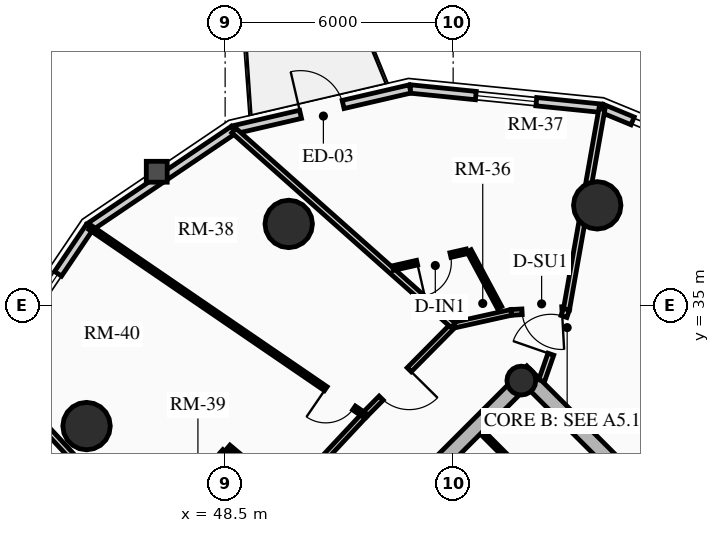
"""IFC4 building model, lengths in metres.
Left out: names, types, materials, properties, quantities, classifications, styles, units other than length and angle.
Written with IfcOpenShell. Run it as: python <this file> out.ifc"""

import sys

from ifc_helpers import new_model, si_unit, direction, frame, frame_2d, origin, origin_2d, place, context, subcontext, project, spatial, rectangle, circle, hollow_circle, extrude, source, transform, mapped, element, fill, save


model = new_model("IFC4")
c1 = context("Model", 3, precision=1e-05, world=origin(), true_north=direction((0.0, 1.0)))
c2 = subcontext(c1, "Body", "Model", "MODEL_VIEW")
j1 = project(units=[si_unit("LENGTHUNIT", "METRE"), si_unit("PLANEANGLEUNIT", "RADIAN")], contexts=[c1])
p1 = place(None, origin())
s1 = spatial("IfcSite", under=j1, at=p1, CompositionType="ELEMENT")
p2 = place(p1, origin())
s2 = spatial("IfcBuilding", under=s1, at=p2, CompositionType="ELEMENT")
p3 = place(p2, frame((0.0, 0.0, 154.51)))
s3 = spatial("IfcBuildingStorey", under=s2, at=p3, CompositionType="ELEMENT", Elevation=154.51)
p4 = place(p3, frame((66.268, 23.298, 0.0), z_axis=(0.0, 0.0, 1.0), x_axis=(-0.707106781187, 0.707106781187, 0.0)))
e1 = element("IfcWall", 1, at=p4, inside=s3, PredefinedType="SHEAR", context=c2, shape_type="SweptSolid", body=[
    extrude(rectangle(XDim=14.1, YDim=0.4, at=frame_2d((7.05, 0.0))), origin(), (0.0, 0.0, 1.0), 2.91),
])
p5 = place(p3, frame((48.873, 25.561, 0.0), z_axis=(0.0, 0.0, 1.0), x_axis=(0.707106781187, 0.707106781187, 0.0)))
e2 = element("IfcWall", 2, at=p5, inside=s3, PredefinedType="SHEAR", context=c2, shape_type="SweptSolid", body=[
    extrude(rectangle(XDim=10.7, YDim=0.4, at=frame_2d((5.35, 0.0))), origin(), (0.0, 0.0, 1.0), 2.91),
])
m1 = source(origin(), c2, "Body", "SweptSolid", [
    extrude(rectangle(XDim=1.5, YDim=2.02, at=frame_2d((0.75, 1.01))), frame((0.0, 0.21, 0.0), z_axis=(0.0, -1.0, 0.0), x_axis=(1.0, 0.0, 0.0)), (0.0, 0.0, 1.0), 0.42),
])
p6 = place(p5, frame((4.6, 0.0, 0.0)))
e3 = element("IfcOpeningElement", 3, at=p6, cuts=e2, PredefinedType="OPENING", context=c2, shape_type="MappedRepresentation", body=[
    mapped(m1, transform((0.0, 0.0, 0.0), x_axis=(1.0, 0.0, 0.0), y_axis=(0.0, 1.0, 0.0), z_axis=(0.0, 0.0, 1.0), scale=1.0)),
])
p7 = place(p3, frame((56.294, 33.024, 0.0), z_axis=(0.0, 0.0, 1.0), x_axis=(0.707106781187, 0.707106781187, 0.0)))
e4 = element("IfcColumn", 4, at=p7, inside=s3, PredefinedType="COLUMN", context=c2, shape_type="SweptSolid", body=[
    extrude(hollow_circle(Radius=0.38, WallThickness=0.032, at=origin_2d()), origin(), (0.0, 0.0, 1.0), 2.91),
])
for number, where, z_axis, x_axis in (
    (5, (58.291, 37.635, 0.0), (0.0, 0.0, 1.0), (1.0, 0.0, 0.0)),
    (6, (50.173, 37.146, 0.0), (0.0, 0.0, 1.0), (1.0, 0.0, 0.0)),
    (7, (44.854, 31.827, 0.0), (0.0, 0.0, 1.0), (1.0, 0.0, 0.0)),
):
    element("IfcColumn", number, at=place(p3, frame(where, z_axis=z_axis, x_axis=x_axis)), inside=s3, PredefinedType="USERDEFINED", context=c2, shape_type="SweptSolid", body=[
        extrude(circle(Radius=0.625, at=origin_2d()), origin(), (0.0, 0.0, 1.0), 2.91),
    ])
p8 = place(p3, frame((58.418, 40.189, 0.0), z_axis=(0.0, 0.0, 1.0), x_axis=(0.924556017656, -0.381046152345, 0.0)))
e8 = element("IfcWall", 8, at=p8, inside=s3, PredefinedType="SOLIDWALL", context=c2, shape_type="SweptSolid", body=[
    extrude(rectangle(XDim=0.87, YDim=0.22, at=frame_2d((0.435, 0.0))), origin(), (0.0, 0.0, 1.0), 2.245),
])
p9 = place(p3, frame((53.367, 40.698, 0.0), z_axis=(0.0, 0.0, 1.0), x_axis=(0.994959267396, -0.100279889424, 0.0)))
e9 = element("IfcWall", 9, at=p9, inside=s3, PredefinedType="SOLIDWALL", context=c2, shape_type="SweptSolid", body=[
    extrude(rectangle(XDim=5.076, YDim=0.22, at=frame_2d((2.538, 0.0))), origin(), (0.0, 0.0, 1.0), 2.245),
])
m2 = source(origin(), c2, "Body", "SweptSolid", [
    extrude(rectangle(XDim=1.6, YDim=1.3, at=frame_2d((0.8, 0.65))), frame((0.0, 0.12, 0.0), z_axis=(0.0, -1.0, 0.0), x_axis=(1.0, 0.0, 0.0)), (0.0, 0.0, 1.0), 0.24),
])
p10 = place(p9, frame((1.738, 0.0, 0.65)))
e10 = element("IfcOpeningElement", 10, at=p10, cuts=e9, PredefinedType="OPENING", context=c2, shape_type="MappedRepresentation", body=[
    mapped(m2, transform((0.0, 0.0, 0.0), x_axis=(1.0, 0.0, 0.0), y_axis=(0.0, 1.0, 0.0), z_axis=(0.0, 0.0, 1.0), scale=1.0)),
])
p11 = place(p3, frame((48.721, 39.622, 0.0), z_axis=(0.0, 0.0, 1.0), x_axis=(0.974206226622, 0.225659540039, 0.0)))
e11 = element("IfcWall", 11, at=p11, inside=s3, PredefinedType="SOLIDWALL", context=c2, shape_type="SweptSolid", body=[
    extrude(rectangle(XDim=4.769, YDim=0.22, at=frame_2d((2.385, 0.0))), origin(), (0.0, 0.0, 1.0), 2.245),
])
m3 = source(origin(), c2, "Body", "SweptSolid", [
    extrude(rectangle(XDim=1.15, YDim=2.005, at=frame_2d((0.575, 1.002))), frame((0.0, 0.12, 0.0), z_axis=(0.0, -1.0, 0.0), x_axis=(1.0, 0.0, 0.0)), (0.0, 0.0, 1.0), 0.24),
])
p12 = place(p11, frame((1.81, 0.0, 0.0)))
e12 = element("IfcOpeningElement", 12, at=p12, cuts=e11, PredefinedType="OPENING", context=c2, shape_type="MappedRepresentation", body=[
    mapped(m3, transform((0.0, 0.0, 0.0), x_axis=(1.0, 0.0, 0.0), y_axis=(0.0, 1.0, 0.0), z_axis=(0.0, 0.0, 1.0), scale=1.0)),
])
p13 = place(p3, frame((44.935, 37.065, 0.0), z_axis=(0.0, 0.0, 1.0), x_axis=(0.828739009952, 0.559635286042, 0.0)))
e13 = element("IfcWall", 13, at=p13, inside=s3, PredefinedType="SOLIDWALL", context=c2, shape_type="SweptSolid", body=[
    extrude(rectangle(XDim=4.569, YDim=0.22, at=frame_2d((2.284, 0.0))), origin(), (0.0, 0.0, 1.0), 2.245),
])
p14 = place(p3, frame((42.378, 33.279, 0.0), z_axis=(0.0, 0.0, 1.0), x_axis=(0.559635286042, 0.828739009952, 0.0)))
e14 = element("IfcWall", 14, at=p14, inside=s3, PredefinedType="SOLIDWALL", context=c2, shape_type="SweptSolid", body=[
    extrude(rectangle(XDim=4.569, YDim=0.22, at=frame_2d((2.284, 0.0))), origin(), (0.0, 0.0, 1.0), 2.245),
])
p15 = place(p14, frame((1.484, 0.0, 0.65)))
e15 = element("IfcOpeningElement", 15, at=p15, cuts=e14, PredefinedType="OPENING", context=c2, shape_type="MappedRepresentation", body=[
    mapped(m2, transform((0.0, 0.0, 0.0), x_axis=(1.0, 0.0, 0.0), y_axis=(0.0, 1.0, 0.0), z_axis=(0.0, 0.0, 1.0), scale=1.0)),
])
p16 = place(p3, frame((57.981, 28.941, 0.0), z_axis=(0.0, 0.0, 1.0), x_axis=(-0.707074823725, 0.707138737204, 0.0)))
e16 = element("IfcWall", 16, at=p16, inside=s3, PredefinedType="PARTITIONING", context=c2, shape_type="SweptSolid", body=[
    extrude(rectangle(XDim=3.82, YDim=0.125, at=frame_2d((1.91, 0.0))), origin(), (0.0, 0.0, 1.0), 2.675),
])
m4 = source(origin(), c2, "Body", "SweptSolid", [
    extrude(rectangle(XDim=0.9, YDim=2.005, at=frame_2d((0.45, 1.002))), frame((0.0, 0.073, 0.0), z_axis=(0.0, -1.0, 0.0), x_axis=(1.0, 0.0, 0.0)), (0.0, 0.0, 1.0), 0.145),
])
p17 = place(p16, frame((1.45, 0.0, 0.0)))
e17 = element("IfcOpeningElement", 17, at=p17, cuts=e16, PredefinedType="OPENING", context=c2, shape_type="MappedRepresentation", body=[
    mapped(m4, transform((0.0, 0.0, 0.0), x_axis=(1.0, 0.0, 0.0), y_axis=(0.0, 1.0, 0.0), z_axis=(0.0, 0.0, 1.0), scale=1.0)),
])
p18 = place(p3, frame((57.482, 34.899, 0.0), z_axis=(0.0, 0.0, 1.0), x_axis=(-0.998466026722, -0.055367801852, 0.0)))
e18 = element("IfcWall", 18, at=p18, inside=s3, PredefinedType="PARTITIONING", context=c2, shape_type="SweptSolid", body=[
    extrude(rectangle(XDim=1.455, YDim=0.15, at=frame_2d((0.728, 0.0))), origin(), (0.0, 0.0, 1.0), 2.245),
])
m5 = source(origin(), c2, "Body", "SweptSolid", [
    extrude(rectangle(XDim=1.05, YDim=2.015, at=frame_2d((0.525, 1.007))), frame((0.0, 0.085, 0.0), z_axis=(0.0, -1.0, 0.0), x_axis=(1.0, 0.0, 0.0)), (0.0, 0.0, 1.0), 0.17),
])
p19 = place(p18, frame((0.12, 0.0, 0.0)))
e19 = element("IfcOpeningElement", 19, at=p19, cuts=e18, PredefinedType="OPENING", context=c2, shape_type="MappedRepresentation", body=[
    mapped(m5, transform((0.0, 0.0, 0.0), x_axis=(1.0, 0.0, 0.0), y_axis=(0.0, 1.0, 0.0), z_axis=(0.0, 0.0, 1.0), scale=1.0)),
])
p20 = place(p3, frame((56.029, 34.819, 0.0), z_axis=(0.0, 0.0, 1.0), x_axis=(-0.976117289068, -0.217244189754, 0.0)))
e20 = element("IfcWall", 20, at=p20, inside=s3, PredefinedType="PARTITIONING", context=c2, shape_type="SweptSolid", body=[
    extrude(rectangle(XDim=1.565, YDim=0.15, at=frame_2d((0.783, 0.0))), origin(), (0.0, 0.0, 1.0), 2.245),
])
p21 = place(p3, frame((54.501, 34.479, 0.0), z_axis=(0.0, 0.0, 1.0), x_axis=(-0.70346073929, -0.710734119258, 0.0)))
e21 = element("IfcWall", 21, at=p21, inside=s3, PredefinedType="PARTITIONING", context=c2, shape_type="SweptSolid", body=[
    extrude(rectangle(XDim=3.323, YDim=0.15, at=frame_2d((1.662, 0.0))), origin(), (0.0, 0.0, 1.0), 2.245),
])
p22 = place(p21, frame((1.645, 0.0, 0.0)))
e22 = element("IfcOpeningElement", 22, at=p22, cuts=e21, PredefinedType="OPENING", context=c2, shape_type="MappedRepresentation", body=[
    mapped(m5, transform((0.0, 0.0, 0.0), x_axis=(1.0, 0.0, 0.0), y_axis=(0.0, 1.0, 0.0), z_axis=(0.0, 0.0, 1.0), scale=1.0)),
])
p23 = place(p3, frame((52.163, 32.117, 0.0), z_axis=(0.0, 0.0, 1.0), x_axis=(-0.682485296115, -0.730899323154, 0.0)))
e23 = element("IfcWall", 23, at=p23, inside=s3, PredefinedType="PARTITIONING", context=c2, shape_type="SweptSolid", body=[
    extrude(rectangle(XDim=6.404, YDim=0.15, at=frame_2d((3.202, 0.0))), origin(), (0.0, 0.0, 1.0), 2.245),
])
p24 = place(p3, frame((57.482, 34.899, 0.0), z_axis=(0.0, 0.0, 1.0), x_axis=(0.174251112754, 0.98470124896, 0.0)))
e24 = element("IfcWall", 24, at=p24, inside=s3, PredefinedType="PARTITIONING", context=c2, shape_type="SweptSolid", body=[
    extrude(rectangle(XDim=5.352, YDim=0.16, at=frame_2d((2.676, 0.0))), origin(), (0.0, 0.0, 1.0), 2.245),
])
p25 = place(p3, frame((54.501, 34.479, 0.0), z_axis=(0.0, 0.0, 1.0), x_axis=(-0.747641382601, 0.66410267506, 0.0)))
e25 = element("IfcWall", 25, at=p25, inside=s3, PredefinedType="PARTITIONING", context=c2, shape_type="SweptSolid", body=[
    extrude(rectangle(XDim=7.718, YDim=0.16, at=frame_2d((3.859, 0.0))), origin(), (0.0, 0.0, 1.0), 2.245),
])
p26 = place(p3, frame((47.792, 27.436, 0.0), z_axis=(0.0, 0.0, 1.0), x_axis=(-0.679077160958, 0.734066897132, 0.0)))
e26 = element("IfcWall", 26, at=p26, inside=s3, PredefinedType="PARTITIONING", context=c2, shape_type="SweptSolid", body=[
    extrude(rectangle(XDim=7.947, YDim=0.16, at=frame_2d((3.974, 0.0))), origin(), (0.0, 0.0, 1.0), 2.245),
])
p27 = place(p3, frame((56.828, 33.021, 0.0), z_axis=(0.0, 0.0, 1.0), x_axis=(0.328682472103, 0.944440486496, 0.0)))
e27 = element("IfcWall", 27, at=p27, inside=s3, PredefinedType="PARTITIONING", context=c2, shape_type="SweptSolid", body=[
    extrude(rectangle(XDim=1.989, YDim=0.16, at=frame_2d((0.995, 0.0))), origin(), (0.0, 0.0, 1.0), 2.245),
])
m6 = source(origin(), c2, "Body", "SweptSolid", [
    extrude(rectangle(XDim=1.05, YDim=2.015, at=frame_2d((0.525, 1.007))), frame((0.0, 0.09, 0.0), z_axis=(0.0, -1.0, 0.0), x_axis=(1.0, 0.0, 0.0)), (0.0, 0.0, 1.0), 0.18),
])
p28 = place(p27, frame((0.739, 0.0, 0.0)))
e28 = element("IfcOpeningElement", 28, at=p28, cuts=e27, PredefinedType="OPENING", context=c2, shape_type="MappedRepresentation", body=[
    mapped(m6, transform((0.0, 0.0, 0.0), x_axis=(1.0, 0.0, 0.0), y_axis=(0.0, 1.0, 0.0), z_axis=(0.0, 0.0, 1.0), scale=1.0)),
])
p29 = place(p3, frame((55.722, 34.944, 0.0), z_axis=(0.0, 0.0, 1.0), x_axis=(-0.473482169178, 0.880803403417, 0.0)))
e29 = element("IfcWall", 29, at=p29, inside=s3, PredefinedType="PARTITIONING", context=c2, shape_type="SweptSolid", body=[
    extrude(rectangle(XDim=1.698, YDim=0.125, at=frame_2d((0.849, 0.0))), origin(), (0.0, 0.0, 1.0), 2.245),
])
p30 = place(p3, frame((54.858, 36.425, 0.0), z_axis=(0.0, 0.0, 1.0), x_axis=(-0.975061820415, -0.221933427785, 0.0)))
e30 = element("IfcWall", 30, at=p30, inside=s3, PredefinedType="PARTITIONING", context=c2, shape_type="SweptSolid", body=[
    extrude(rectangle(XDim=1.993, YDim=0.125, at=frame_2d((0.997, 0.0))), origin(), (0.0, 0.0, 1.0), 2.675),
])
p31 = place(p30, frame((0.44, 0.0, 0.0)))
e31 = element("IfcOpeningElement", 31, at=p31, cuts=e30, PredefinedType="OPENING", context=c2, shape_type="MappedRepresentation", body=[
    mapped(m4, transform((0.0, 0.0, 0.0), x_axis=(1.0, 0.0, 0.0), y_axis=(0.0, 1.0, 0.0), z_axis=(0.0, 0.0, 1.0), scale=1.0)),
])
p32 = place(p3, frame((52.163, 32.117, 0.0), z_axis=(0.0, 0.0, 1.0), x_axis=(-0.825403853282, 0.564542716707, 0.0)))
e32 = element("IfcWall", 32, at=p32, inside=s3, PredefinedType="PARTITIONING", context=c2, shape_type="SweptSolid", body=[
    extrude(rectangle(XDim=8.74, YDim=0.125, at=frame_2d((4.37, 0.0))), origin(), (0.0, 0.0, 1.0), 2.245),
])
p33 = place(p32, frame((0.33, 0.0, 0.0)))
e33 = element("IfcOpeningElement", 33, at=p33, cuts=e32, PredefinedType="OPENING", context=c2, shape_type="MappedRepresentation", body=[
    mapped(m4, transform((0.0, 0.0, 0.0), x_axis=(1.0, 0.0, 0.0), y_axis=(0.0, 1.0, 0.0), z_axis=(0.0, 0.0, 1.0), scale=1.0)),
])
p34 = place(p3, frame((49.961, 30.124, 0.0), z_axis=(0.0, 0.0, 1.0), x_axis=(-0.766210982885, 0.64258908309, 0.0)))
e34 = element("IfcWall", 34, at=p34, inside=s3, PredefinedType="PARTITIONING", context=c2, shape_type="SweptSolid", body=[
    extrude(rectangle(XDim=1.795, YDim=0.125, at=frame_2d((0.897, 0.0))), origin(), (0.0, 0.0, 1.0), 2.675),
])
p35 = place(p3, frame((48.488, 31.166, 0.0), z_axis=(0.0, 0.0, 1.0), x_axis=(-0.660635615229, -0.750706722956, 0.0)))
e35 = element("IfcWall", 35, at=p35, inside=s3, PredefinedType="PARTITIONING", context=c2, shape_type="SweptSolid", body=[
    extrude(rectangle(XDim=2.852, YDim=0.125, at=frame_2d((1.426, 0.0))), origin(), (0.0, 0.0, 1.0), 2.245),
])
p36 = place(p35, frame((0.12, 0.0, 0.0)))
e36 = element("IfcOpeningElement", 36, at=p36, cuts=e35, PredefinedType="OPENING", context=c2, shape_type="MappedRepresentation", body=[
    mapped(m4, transform((0.0, 0.0, 0.0), x_axis=(1.0, 0.0, 0.0), y_axis=(0.0, 1.0, 0.0), z_axis=(0.0, 0.0, 1.0), scale=1.0)),
])
m7 = source(origin(), c2, "Body", "SweptSolid", [
    extrude(rectangle(XDim=1.6, YDim=1.3, at=frame_2d((0.8, 0.65))), frame((0.0, 0.03, 0.0), z_axis=(0.0, -1.0, 0.0), x_axis=(1.0, 0.0, 0.0)), (0.0, 0.0, 1.0), 0.06),
])
p37 = place(p10, origin())
e37 = element("IfcWindow", 37, at=p37, inside=s3, PartitioningType="SINGLE_PANEL", PredefinedType="WINDOW", context=c2, shape_type="MappedRepresentation", body=[
    mapped(m7, transform((0.0, 0.0, 0.0), x_axis=(1.0, 0.0, 0.0), y_axis=(0.0, 1.0, 0.0), z_axis=(0.0, 0.0, 1.0), scale=1.0)),
])
fill(e10, e37)
m8 = source(origin(), c2, "Body", "SweptSolid", [
    extrude(rectangle(XDim=1.15, YDim=2.005, at=frame_2d((0.575, 1.002))), frame((0.0, 0.025, 0.0), z_axis=(0.0, -1.0, 0.0), x_axis=(1.0, 0.0, 0.0)), (0.0, 0.0, 1.0), 0.05),
])
p38 = place(p12, origin())
e38 = element("IfcDoor", 38, at=p38, inside=s3, OperationType="SINGLE_SWING_LEFT", PredefinedType="DOOR", context=c2, shape_type="MappedRepresentation", body=[
    mapped(m8, transform((0.0, 0.0, 0.0), x_axis=(1.0, 0.0, 0.0), y_axis=(0.0, 1.0, 0.0), z_axis=(0.0, 0.0, 1.0), scale=1.0)),
])
fill(e12, e38)
p39 = place(p15, origin())
e39 = element("IfcWindow", 39, at=p39, inside=s3, PartitioningType="SINGLE_PANEL", PredefinedType="WINDOW", context=c2, shape_type="MappedRepresentation", body=[
    mapped(m7, transform((0.0, 0.0, 0.0), x_axis=(1.0, 0.0, 0.0), y_axis=(0.0, 1.0, 0.0), z_axis=(0.0, 0.0, 1.0), scale=1.0)),
])
fill(e15, e39)
m9 = source(origin(), c2, "Body", "SweptSolid", [
    extrude(rectangle(XDim=1.05, YDim=2.015, at=frame_2d((0.525, 1.007))), frame((0.0, 0.025, 0.0), z_axis=(0.0, -1.0, 0.0), x_axis=(1.0, 0.0, 0.0)), (0.0, 0.0, 1.0), 0.05),
])
p40 = place(p28, origin())
e40 = element("IfcDoor", 40, at=p40, inside=s3, OperationType="SINGLE_SWING_LEFT", PredefinedType="DOOR", context=c2, shape_type="MappedRepresentation", body=[
    mapped(m9, transform((0.0, 0.0, 0.0), x_axis=(1.0, 0.0, 0.0), y_axis=(0.0, 1.0, 0.0), z_axis=(0.0, 0.0, 1.0), scale=1.0)),
])
fill(e28, e40)
p41 = place(p19, origin())
e41 = element("IfcDoor", 41, at=p41, inside=s3, OperationType="SINGLE_SWING_LEFT", PredefinedType="DOOR", context=c2, shape_type="MappedRepresentation", body=[
    mapped(m9, transform((0.0, 0.0, 0.0), x_axis=(1.0, 0.0, 0.0), y_axis=(0.0, 1.0, 0.0), z_axis=(0.0, 0.0, 1.0), scale=1.0)),
])
fill(e19, e41)
m10 = source(origin(), c2, "Body", "SweptSolid", [
    extrude(rectangle(XDim=0.9, YDim=2.005, at=frame_2d((0.45, 1.002))), frame((0.0, 0.025, 0.0), z_axis=(0.0, -1.0, 0.0), x_axis=(1.0, 0.0, 0.0)), (0.0, 0.0, 1.0), 0.05),
])
p42 = place(p31, origin())
e42 = element("IfcDoor", 42, at=p42, inside=s3, OperationType="SINGLE_SWING_RIGHT", PredefinedType="DOOR", context=c2, shape_type="MappedRepresentation", body=[
    mapped(m10, transform((0.0, 0.0, 0.0), x_axis=(1.0, 0.0, 0.0), y_axis=(0.0, 1.0, 0.0), z_axis=(0.0, 0.0, 1.0), scale=1.0)),
])
fill(e31, e42)
p43 = place(p22, origin())
e43 = element("IfcDoor", 43, at=p43, inside=s3, OperationType="SINGLE_SWING_LEFT", PredefinedType="DOOR", context=c2, shape_type="MappedRepresentation", body=[
    mapped(m9, transform((0.0, 0.0, 0.0), x_axis=(1.0, 0.0, 0.0), y_axis=(0.0, 1.0, 0.0), z_axis=(0.0, 0.0, 1.0), scale=1.0)),
])
fill(e22, e43)
p44 = place(p33, origin())
e44 = element("IfcDoor", 44, at=p44, inside=s3, OperationType="SINGLE_SWING_RIGHT", PredefinedType="DOOR", context=c2, shape_type="MappedRepresentation", body=[
    mapped(m10, transform((0.0, 0.0, 0.0), x_axis=(1.0, 0.0, 0.0), y_axis=(0.0, 1.0, 0.0), z_axis=(0.0, 0.0, 1.0), scale=1.0)),
])
fill(e33, e44)
save(model, sys.argv[1])
